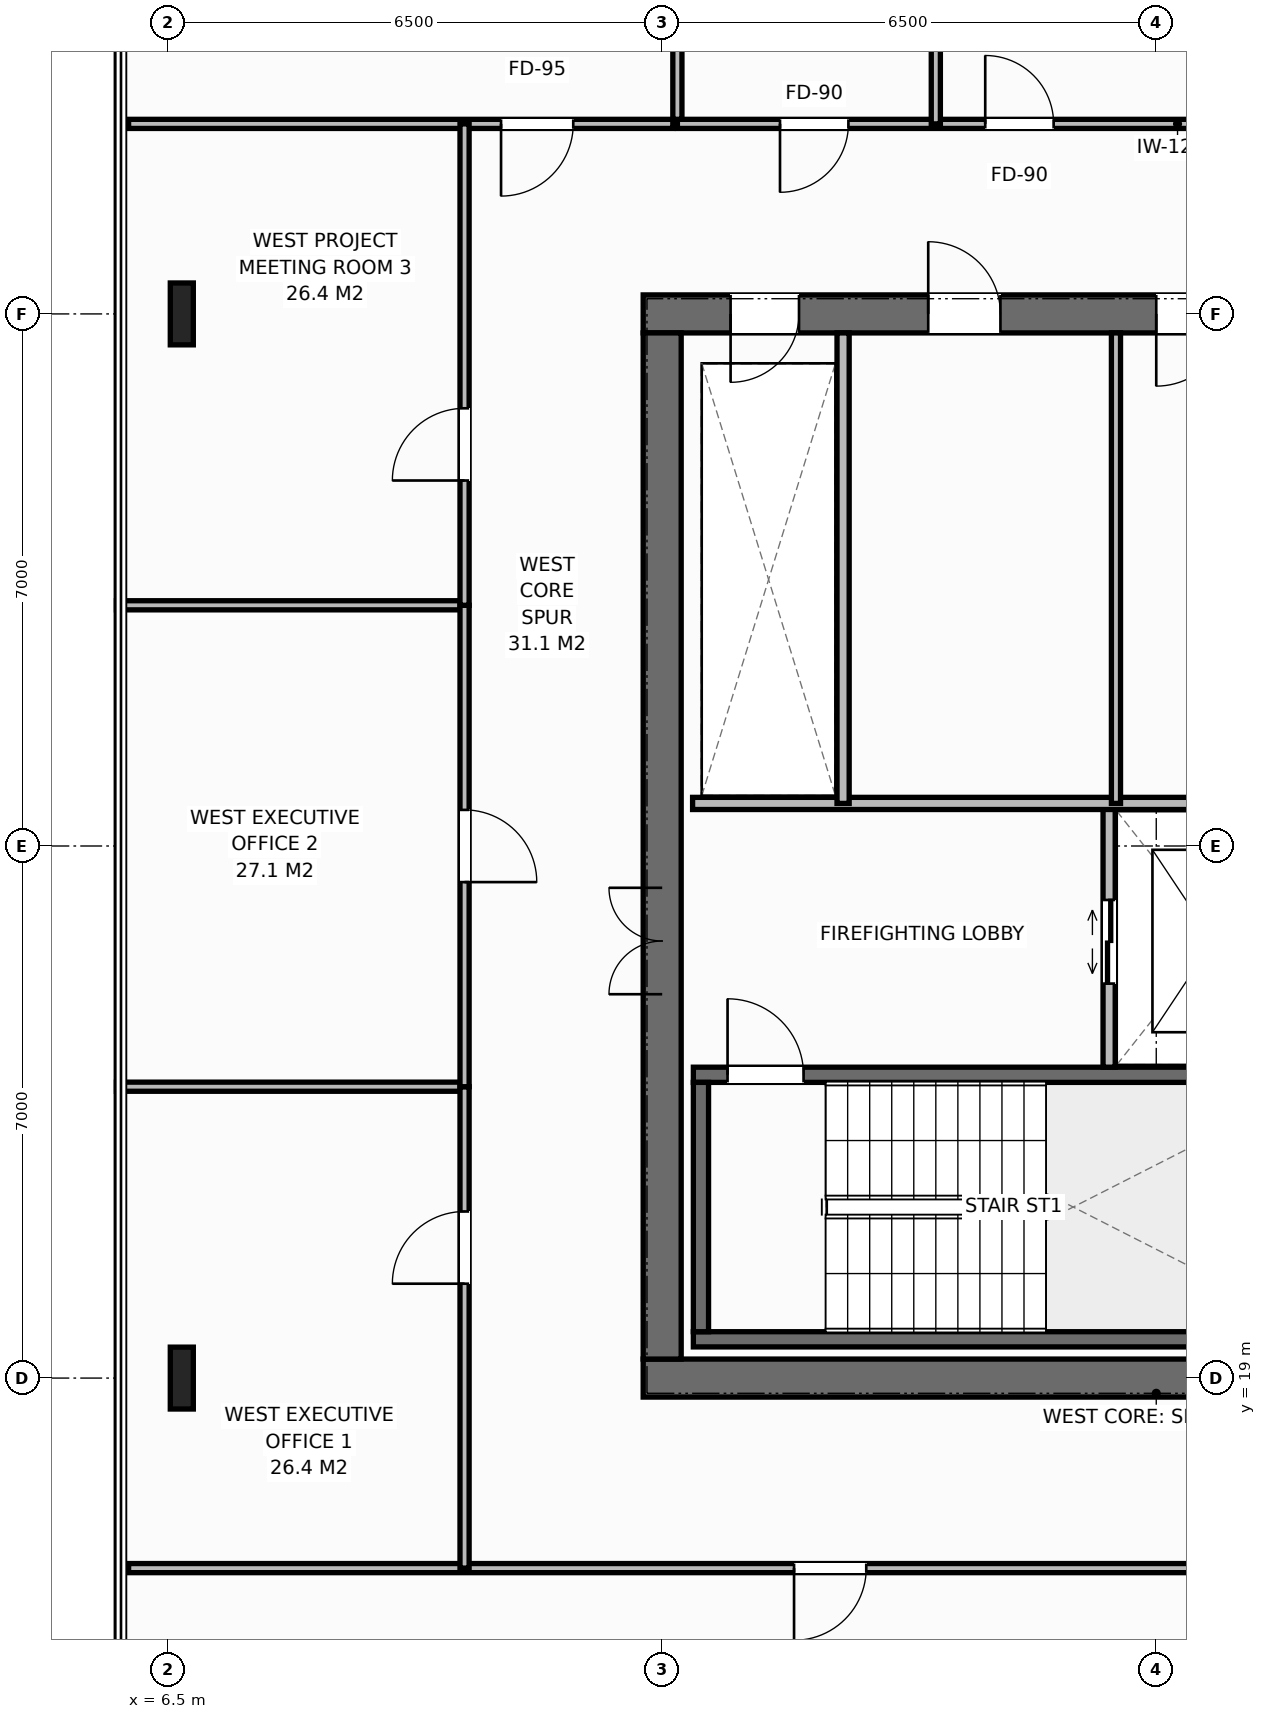
"""IFC4 building model, lengths in metres.
Left out: names, types, materials, properties, quantities, classifications, styles, units other than length and angle.
Written with IfcOpenShell. Run it as: python <this file> out.ifc"""

import sys

from ifc_helpers import new_model, si_unit, direction, frame, frame_2d, origin, origin_2d, place, context, subcontext, project, spatial, rectangle, i_section, extrude, element, fill, save


model = new_model("IFC4")
c1 = context("Model", 3, precision=1e-05, world=origin(), true_north=direction((0.0, 1.0)))
c2 = subcontext(c1, "Body", "Model", "MODEL_VIEW")
j1 = project(units=[si_unit("LENGTHUNIT", "METRE"), si_unit("PLANEANGLEUNIT", "RADIAN")], contexts=[c1])
p1 = place(None, origin())
s1 = spatial("IfcSite", under=j1, at=p1, CompositionType="ELEMENT")
p2 = place(p1, origin())
s2 = spatial("IfcBuilding", under=s1, at=p2, CompositionType="ELEMENT")
p3 = place(p2, frame((0.0, 0.0, 225.2)))
s3 = spatial("IfcBuildingStorey", under=s2, at=p3, CompositionType="ELEMENT", Elevation=225.2)
p4 = place(p3, frame((12.75, 19.0, 0.0), z_axis=(0.0, 0.0, 1.0), x_axis=(1.0, 0.0, 0.0)))
e1 = element("IfcWall", 1, at=p4, inside=s3, PredefinedType="SHEAR", context=c2, shape_type="SweptSolid", body=[
    extrude(rectangle(XDim=13.5, YDim=0.5, at=frame_2d((6.75, 0.0))), origin(), (0.0, 0.0, 1.0), 3.8),
])
p5 = place(p4, frame((9.13, 0.0, 0.0)))
e2 = element("IfcOpeningElement", 2, at=p5, cuts=e1, PredefinedType="OPENING", context=c2, shape_type="SweptSolid", body=[
    extrude(rectangle(XDim=1.4, YDim=2.2, at=frame_2d((0.7, 1.1))), frame((0.0, 0.26, 0.0), z_axis=(0.0, -1.0, 0.0), x_axis=(1.0, 0.0, 0.0)), (0.0, 0.0, 1.0), 0.52),
])
p6 = place(p3, frame((12.75, 33.0, 0.0), z_axis=(0.0, 0.0, 1.0), x_axis=(1.0, 0.0, 0.0)))
e3 = element("IfcWall", 3, at=p6, inside=s3, PredefinedType="SHEAR", context=c2, shape_type="SweptSolid", body=[
    extrude(rectangle(XDim=13.5, YDim=0.5, at=frame_2d((6.75, 0.0))), origin(), (0.0, 0.0, 1.0), 3.8),
])
p7 = place(p6, frame((1.15, 0.0, 0.0)))
e4 = element("IfcOpeningElement", 4, at=p7, cuts=e3, PredefinedType="OPENING", context=c2, shape_type="SweptSolid", body=[
    extrude(rectangle(XDim=0.9, YDim=2.15, at=frame_2d((0.45, 1.075))), frame((0.0, 0.26, 0.0), z_axis=(0.0, -1.0, 0.0), x_axis=(1.0, 0.0, 0.0)), (0.0, 0.0, 1.0), 0.52),
])
p8 = place(p6, frame((3.75, 0.0, 0.0)))
e5 = element("IfcOpeningElement", 5, at=p8, cuts=e3, PredefinedType="OPENING", context=c2, shape_type="SweptSolid", body=[
    extrude(rectangle(XDim=0.95, YDim=2.15, at=frame_2d((0.475, 1.075))), frame((0.0, 0.26, 0.0), z_axis=(0.0, -1.0, 0.0), x_axis=(1.0, 0.0, 0.0)), (0.0, 0.0, 1.0), 0.52),
])
p9 = place(p6, frame((6.75, 0.0, 0.0)))
e6 = element("IfcOpeningElement", 6, at=p9, cuts=e3, PredefinedType="OPENING", context=c2, shape_type="SweptSolid", body=[
    extrude(rectangle(XDim=0.95, YDim=2.15, at=frame_2d((0.475, 1.075))), frame((0.0, 0.26, 0.0), z_axis=(0.0, -1.0, 0.0), x_axis=(1.0, 0.0, 0.0)), (0.0, 0.0, 1.0), 0.52),
])
p10 = place(p6, frame((9.13, 0.0, 0.0)))
e7 = element("IfcOpeningElement", 7, at=p10, cuts=e3, PredefinedType="OPENING", context=c2, shape_type="SweptSolid", body=[
    extrude(rectangle(XDim=1.4, YDim=2.2, at=frame_2d((0.7, 1.1))), frame((0.0, 0.26, 0.0), z_axis=(0.0, -1.0, 0.0), x_axis=(1.0, 0.0, 0.0)), (0.0, 0.0, 1.0), 0.52),
])
p11 = place(p3, frame((13.0, 19.25, 0.0), z_axis=(0.0, 0.0, 1.0), x_axis=(0.0, 1.0, 0.0)))
e8 = element("IfcWall", 8, at=p11, inside=s3, PredefinedType="SHEAR", context=c2, shape_type="SweptSolid", body=[
    extrude(rectangle(XDim=13.5, YDim=0.5, at=frame_2d((6.75, 0.0))), origin(), (0.0, 0.0, 1.0), 3.8),
])
p12 = place(p11, frame((4.8, 0.0, 0.0)))
e9 = element("IfcOpeningElement", 9, at=p12, cuts=e8, PredefinedType="OPENING", context=c2, shape_type="SweptSolid", body=[
    extrude(rectangle(XDim=1.4, YDim=2.2, at=frame_2d((0.7, 1.1))), frame((0.0, 0.26, 0.0), z_axis=(0.0, -1.0, 0.0), x_axis=(1.0, 0.0, 0.0)), (0.0, 0.0, 1.0), 0.52),
])
p13 = place(p3, frame((13.41, 19.51, 0.0), z_axis=(0.0, 0.0, 1.0), x_axis=(1.0, 0.0, 0.0)))
e10 = element("IfcWall", 10, at=p13, inside=s3, PredefinedType="SHEAR", context=c2, shape_type="SweptSolid", body=[
    extrude(rectangle(XDim=8.43, YDim=0.2, at=frame_2d((4.215, 0.0))), origin(), (0.0, 0.0, 1.0), 3.8),
])
p14 = place(p3, frame((13.41, 22.99, 0.0), z_axis=(0.0, 0.0, 1.0), x_axis=(1.0, 0.0, 0.0)))
e11 = element("IfcWall", 11, at=p14, inside=s3, PredefinedType="SHEAR", context=c2, shape_type="SweptSolid", body=[
    extrude(rectangle(XDim=8.43, YDim=0.2, at=frame_2d((4.215, 0.0))), origin(), (0.0, 0.0, 1.0), 3.8),
])
p15 = place(p14, frame((0.45, 0.0, 0.0)))
e12 = element("IfcOpeningElement", 12, at=p15, cuts=e11, PredefinedType="OPENING", context=c2, shape_type="SweptSolid", body=[
    extrude(rectangle(XDim=1.0, YDim=2.15, at=frame_2d((0.5, 1.075))), frame((0.0, 0.11, 0.0), z_axis=(0.0, -1.0, 0.0), x_axis=(1.0, 0.0, 0.0)), (0.0, 0.0, 1.0), 0.22),
])
p16 = place(p3, frame((13.51, 19.61, 0.0), z_axis=(0.0, 0.0, 1.0), x_axis=(0.0, 1.0, 0.0)))
e13 = element("IfcWall", 13, at=p16, inside=s3, PredefinedType="SHEAR", context=c2, shape_type="SweptSolid", body=[
    extrude(rectangle(XDim=3.28, YDim=0.2, at=frame_2d((1.64, 0.0))), origin(), (0.0, 0.0, 1.0), 3.8),
])
for number, where, z_axis, x_axis in (
    (14, (6.68, 19.0, 0.0), (0.0, 0.0, 1.0), (1.0, 0.0, 0.0)),
    (15, (6.68, 33.0, 0.0), (0.0, 0.0, 1.0), (1.0, 0.0, 0.0)),
):
    element("IfcColumn", number, at=place(p3, frame(where, z_axis=z_axis, x_axis=x_axis)), inside=s3, PredefinedType="COLUMN", context=c2, shape_type="SweptSolid", body=[
        extrude(i_section(OverallWidth=0.303, OverallDepth=0.814, WebThickness=0.021, FlangeThickness=0.04, at=origin_2d()), origin(), (0.0, 0.0, 1.0), 3.8),
    ])
p17 = place(p3, frame((18.88, 23.09, 0.0), z_axis=(0.0, 0.0, 1.0), x_axis=(0.0, 1.0, 0.0)))
e16 = element("IfcWall", 16, at=p17, inside=s3, PredefinedType="STANDARD", context=c2, shape_type="SweptSolid", body=[
    extrude(rectangle(XDim=3.47, YDim=0.16, at=frame_2d((1.735, 0.0))), origin(), (0.0, 0.0, 1.0), 3.58),
])
p18 = place(p17, frame((1.1, 0.0, 0.0)))
e17 = element("IfcOpeningElement", 17, at=p18, cuts=e16, PredefinedType="OPENING", context=c2, shape_type="SweptSolid", body=[
    extrude(rectangle(XDim=1.1, YDim=2.2, at=frame_2d((0.55, 1.1))), frame((0.0, 0.09, 0.0), z_axis=(0.0, -1.0, 0.0), x_axis=(1.0, 0.0, 0.0)), (0.0, 0.0, 1.0), 0.18),
])
p19 = place(p3, frame((13.4, 26.56, 0.0), z_axis=(0.0, 0.0, 1.0), x_axis=(1.0, 0.0, 0.0)))
e18 = element("IfcWall", 18, at=p19, inside=s3, PredefinedType="STANDARD", context=c2, shape_type="SweptSolid", body=[
    extrude(rectangle(XDim=8.34, YDim=0.16, at=frame_2d((4.17, 0.0))), origin(), (0.0, 0.0, 1.0), 3.58),
])
p20 = place(p3, frame((15.38, 26.56, 0.0), z_axis=(0.0, 0.0, 1.0), x_axis=(0.0, 1.0, 0.0)))
e19 = element("IfcWall", 19, at=p20, inside=s3, PredefinedType="STANDARD", context=c2, shape_type="SweptSolid", body=[
    extrude(rectangle(XDim=6.19, YDim=0.16, at=frame_2d((3.095, 0.0))), origin(), (0.0, 0.0, 1.0), 3.58),
])
p21 = place(p3, frame((18.97, 26.56, 0.0), z_axis=(0.0, 0.0, 1.0), x_axis=(0.0, 1.0, 0.0)))
e20 = element("IfcWall", 20, at=p21, inside=s3, PredefinedType="PARTITIONING", context=c2, shape_type="SweptSolid", body=[
    extrude(rectangle(XDim=6.19, YDim=0.12, at=frame_2d((3.095, 0.0))), origin(), (0.0, 0.0, 1.0), 3.58),
])
p22 = place(p3, frame((13.2, 35.5, 0.0), z_axis=(0.0, 0.0, 1.0), x_axis=(1.0, 0.0, 0.0)))
e21 = element("IfcWall", 21, at=p22, inside=s3, PredefinedType="PARTITIONING", context=c2, shape_type="SweptSolid", body=[
    extrude(rectangle(XDim=13.16, YDim=0.12, at=frame_2d((6.58, 0.0))), origin(), (0.0, 0.0, 1.0), 3.58),
])
p23 = place(p22, frame((1.35, 0.0, 0.0)))
e22 = element("IfcOpeningElement", 22, at=p23, cuts=e21, PredefinedType="OPENING", context=c2, shape_type="SweptSolid", body=[
    extrude(rectangle(XDim=0.9, YDim=2.15, at=frame_2d((0.45, 1.075))), frame((0.0, 0.07, 0.0), z_axis=(0.0, -1.0, 0.0), x_axis=(1.0, 0.0, 0.0)), (0.0, 0.0, 1.0), 0.14),
])
p24 = place(p22, frame((4.05, 0.0, 0.0)))
e23 = element("IfcOpeningElement", 23, at=p24, cuts=e21, PredefinedType="OPENING", context=c2, shape_type="SweptSolid", body=[
    extrude(rectangle(XDim=0.9, YDim=2.15, at=frame_2d((0.45, 1.075))), frame((0.0, 0.07, 0.0), z_axis=(0.0, -1.0, 0.0), x_axis=(1.0, 0.0, 0.0)), (0.0, 0.0, 1.0), 0.14),
])
p25 = place(p22, frame((8.25, 0.0, 0.0)))
e24 = element("IfcOpeningElement", 24, at=p25, cuts=e21, PredefinedType="OPENING", context=c2, shape_type="SweptSolid", body=[
    extrude(rectangle(XDim=0.9, YDim=2.15, at=frame_2d((0.45, 1.075))), frame((0.0, 0.07, 0.0), z_axis=(0.0, -1.0, 0.0), x_axis=(1.0, 0.0, 0.0)), (0.0, 0.0, 1.0), 0.14),
])
p26 = place(p22, frame((11.0, 0.0, 0.0)))
e25 = element("IfcOpeningElement", 25, at=p26, cuts=e21, PredefinedType="OPENING", context=c2, shape_type="SweptSolid", body=[
    extrude(rectangle(XDim=0.95, YDim=2.15, at=frame_2d((0.475, 1.075))), frame((0.0, 0.07, 0.0), z_axis=(0.0, -1.0, 0.0), x_axis=(1.0, 0.0, 0.0)), (0.0, 0.0, 1.0), 0.14),
])
p27 = place(p3, frame((16.6, 35.5, 0.0), z_axis=(0.0, 0.0, 1.0), x_axis=(0.0, 1.0, 0.0)))
e26 = element("IfcWall", 26, at=p27, inside=s3, PredefinedType="PARTITIONING", context=c2, shape_type="SweptSolid", body=[
    extrude(rectangle(XDim=2.68, YDim=0.12, at=frame_2d((1.34, 0.0))), origin(), (0.0, 0.0, 1.0), 3.58),
])
p28 = place(p3, frame((13.2, 35.56, 0.0), z_axis=(0.0, 0.0, 1.0), x_axis=(0.0, 1.0, 0.0)))
e27 = element("IfcWall", 27, at=p28, inside=s3, PredefinedType="PARTITIONING", context=c2, shape_type="SweptSolid", body=[
    extrude(rectangle(XDim=11.42, YDim=0.12, at=frame_2d((5.71, 0.0))), origin(), (0.0, 0.0, 1.0), 2.88),
])
p29 = place(p3, frame((5.98, 35.5, 0.0), z_axis=(0.0, 0.0, 1.0), x_axis=(1.0, 0.0, 0.0)))
e28 = element("IfcWall", 28, at=p29, inside=s3, PredefinedType="PARTITIONING", context=c2, shape_type="SweptSolid", body=[
    extrude(rectangle(XDim=7.16, YDim=0.12, at=frame_2d((3.58, 0.0))), origin(), (0.0, 0.0, 1.0), 3.58),
])
p30 = place(p29, frame((4.9, 0.0, 0.0)))
e29 = element("IfcOpeningElement", 29, at=p30, cuts=e28, PredefinedType="OPENING", context=c2, shape_type="SweptSolid", body=[
    extrude(rectangle(XDim=0.95, YDim=2.15, at=frame_2d((0.475, 1.075))), frame((0.0, 0.07, 0.0), z_axis=(0.0, -1.0, 0.0), x_axis=(1.0, 0.0, 0.0)), (0.0, 0.0, 1.0), 0.14),
])
p31 = place(p3, frame((5.98, 16.5, 0.0), z_axis=(0.0, 0.0, 1.0), x_axis=(1.0, 0.0, 0.0)))
e30 = element("IfcWall", 30, at=p31, inside=s3, PredefinedType="PARTITIONING", context=c2, shape_type="SweptSolid", body=[
    extrude(rectangle(XDim=14.04, YDim=0.12, at=frame_2d((7.02, 0.0))), origin(), (0.0, 0.0, 1.0), 3.58),
])
p32 = place(p31, frame((8.755, 0.0, 0.0)))
e31 = element("IfcOpeningElement", 31, at=p32, cuts=e30, PredefinedType="OPENING", context=c2, shape_type="SweptSolid", body=[
    extrude(rectangle(XDim=0.95, YDim=2.15, at=frame_2d((0.475, 1.075))), frame((0.0, 0.07, 0.0), z_axis=(0.0, -1.0, 0.0), x_axis=(1.0, 0.0, 0.0)), (0.0, 0.0, 1.0), 0.14),
])
p33 = place(p3, frame((5.82, 22.833, 0.0), z_axis=(0.0, 0.0, 1.0), x_axis=(1.0, 0.0, 0.0)))
e32 = element("IfcWall", 32, at=p33, inside=s3, PredefinedType="PARTITIONING", context=c2, shape_type="SweptSolid", body=[
    extrude(rectangle(XDim=4.58, YDim=0.12, at=frame_2d((2.29, 0.0))), origin(), (0.0, 0.0, 1.0), 3.58),
])
p34 = place(p3, frame((10.4, 16.5, 0.0), z_axis=(0.0, 0.0, 1.0), x_axis=(0.0, 1.0, 0.0)))
e33 = element("IfcWall", 33, at=p34, inside=s3, PredefinedType="PARTITIONING", context=c2, shape_type="SweptSolid", body=[
    extrude(rectangle(XDim=6.333, YDim=0.12, at=frame_2d((3.167, 0.0))), origin(), (0.0, 0.0, 1.0), 3.58),
])
p35 = place(p34, frame((3.742, 0.0, 0.0)))
e34 = element("IfcOpeningElement", 34, at=p35, cuts=e33, PredefinedType="OPENING", context=c2, shape_type="SweptSolid", body=[
    extrude(rectangle(XDim=0.95, YDim=2.15, at=frame_2d((0.475, 1.075))), frame((0.0, 0.07, 0.0), z_axis=(0.0, -1.0, 0.0), x_axis=(1.0, 0.0, 0.0)), (0.0, 0.0, 1.0), 0.14),
])
p36 = place(p3, frame((5.82, 29.167, 0.0), z_axis=(0.0, 0.0, 1.0), x_axis=(1.0, 0.0, 0.0)))
e35 = element("IfcWall", 35, at=p36, inside=s3, PredefinedType="PARTITIONING", context=c2, shape_type="SweptSolid", body=[
    extrude(rectangle(XDim=4.58, YDim=0.12, at=frame_2d((2.29, 0.0))), origin(), (0.0, 0.0, 1.0), 3.58),
])
p37 = place(p3, frame((10.4, 22.833, 0.0), z_axis=(0.0, 0.0, 1.0), x_axis=(0.0, 1.0, 0.0)))
e36 = element("IfcWall", 36, at=p37, inside=s3, PredefinedType="PARTITIONING", context=c2, shape_type="SweptSolid", body=[
    extrude(rectangle(XDim=6.333, YDim=0.12, at=frame_2d((3.167, 0.0))), origin(), (0.0, 0.0, 1.0), 3.58),
])
p38 = place(p37, frame((2.692, 0.0, 0.0)))
e37 = element("IfcOpeningElement", 37, at=p38, cuts=e36, PredefinedType="OPENING", context=c2, shape_type="SweptSolid", body=[
    extrude(rectangle(XDim=0.95, YDim=2.15, at=frame_2d((0.475, 1.075))), frame((0.0, 0.07, 0.0), z_axis=(0.0, -1.0, 0.0), x_axis=(1.0, 0.0, 0.0)), (0.0, 0.0, 1.0), 0.14),
])
p39 = place(p3, frame((10.4, 29.167, 0.0), z_axis=(0.0, 0.0, 1.0), x_axis=(0.0, 1.0, 0.0)))
e38 = element("IfcWall", 38, at=p39, inside=s3, PredefinedType="PARTITIONING", context=c2, shape_type="SweptSolid", body=[
    extrude(rectangle(XDim=6.333, YDim=0.12, at=frame_2d((3.167, 0.0))), origin(), (0.0, 0.0, 1.0), 3.58),
])
p40 = place(p39, frame((1.642, 0.0, 0.0)))
e39 = element("IfcOpeningElement", 39, at=p40, cuts=e38, PredefinedType="OPENING", context=c2, shape_type="SweptSolid", body=[
    extrude(rectangle(XDim=0.95, YDim=2.15, at=frame_2d((0.475, 1.075))), frame((0.0, 0.07, 0.0), z_axis=(0.0, -1.0, 0.0), x_axis=(1.0, 0.0, 0.0)), (0.0, 0.0, 1.0), 0.14),
])
p41 = place(p15, origin())
e40 = element("IfcDoor", 40, at=p41, inside=s3, OperationType="SINGLE_SWING_LEFT", PredefinedType="DOOR", context=c2, shape_type="SweptSolid", body=[
    extrude(rectangle(XDim=1.0, YDim=2.15, at=frame_2d((0.5, 1.075))), frame((0.0, 0.025, 0.0), z_axis=(0.0, -1.0, 0.0), x_axis=(1.0, 0.0, 0.0)), (0.0, 0.0, 1.0), 0.05),
])
fill(e12, e40)
p42 = place(p12, origin())
e41 = element("IfcDoor", 41, at=p42, inside=s3, OperationType="DOUBLE_DOOR_SINGLE_SWING", PredefinedType="DOOR", context=c2, shape_type="SweptSolid", body=[
    extrude(rectangle(XDim=1.4, YDim=2.2, at=frame_2d((0.7, 1.1))), frame((0.0, 0.025, 0.0), z_axis=(0.0, -1.0, 0.0), x_axis=(1.0, 0.0, 0.0)), (0.0, 0.0, 1.0), 0.05),
])
fill(e9, e41)
p43 = place(p18, origin())
e42 = element("IfcDoor", 42, at=p43, inside=s3, OperationType="DOUBLE_DOOR_SLIDING", PredefinedType="DOOR", context=c2, shape_type="SweptSolid", body=[
    extrude(rectangle(XDim=1.1, YDim=2.2, at=frame_2d((0.55, 1.1))), frame((0.0, 0.025, 0.0), z_axis=(0.0, -1.0, 0.0), x_axis=(1.0, 0.0, 0.0)), (0.0, 0.0, 1.0), 0.05),
])
fill(e17, e42)
p44 = place(p7, origin())
e43 = element("IfcDoor", 43, at=p44, inside=s3, OperationType="SINGLE_SWING_RIGHT", PredefinedType="DOOR", context=c2, shape_type="SweptSolid", body=[
    extrude(rectangle(XDim=0.9, YDim=2.15, at=frame_2d((0.45, 1.075))), frame((0.0, -0.025, 0.0), z_axis=(0.0, -1.0, 0.0), x_axis=(1.0, 0.0, 0.0)), (0.0, 0.0, 1.0), 0.05),
])
fill(e4, e43)
p45 = place(p8, origin())
e44 = element("IfcDoor", 44, at=p45, inside=s3, OperationType="SINGLE_SWING_LEFT", PredefinedType="DOOR", context=c2, shape_type="SweptSolid", body=[
    extrude(rectangle(XDim=0.95, YDim=2.15, at=frame_2d((0.475, 1.075))), frame((0.0, -0.025, 0.0), z_axis=(0.0, -1.0, 0.0), x_axis=(1.0, 0.0, 0.0)), (0.0, 0.0, 1.0), 0.05),
])
fill(e5, e44)
p46 = place(p9, origin())
e45 = element("IfcDoor", 45, at=p46, inside=s3, OperationType="SINGLE_SWING_RIGHT", PredefinedType="DOOR", context=c2, shape_type="SweptSolid", body=[
    extrude(rectangle(XDim=0.95, YDim=2.15, at=frame_2d((0.475, 1.075))), frame((0.0, -0.025, 0.0), z_axis=(0.0, -1.0, 0.0), x_axis=(1.0, 0.0, 0.0)), (0.0, 0.0, 1.0), 0.05),
])
fill(e6, e45)
p47 = place(p23, origin())
e46 = element("IfcDoor", 46, at=p47, inside=s3, OperationType="SINGLE_SWING_RIGHT", PredefinedType="DOOR", context=c2, shape_type="SweptSolid", body=[
    extrude(rectangle(XDim=0.9, YDim=2.15, at=frame_2d((0.45, 1.075))), frame((0.0, 0.025, 0.0), z_axis=(0.0, -1.0, 0.0), x_axis=(1.0, 0.0, 0.0)), (0.0, 0.0, 1.0), 0.05),
])
fill(e22, e46)
p48 = place(p24, origin())
e47 = element("IfcDoor", 47, at=p48, inside=s3, OperationType="SINGLE_SWING_LEFT", PredefinedType="DOOR", context=c2, shape_type="SweptSolid", body=[
    extrude(rectangle(XDim=0.9, YDim=2.15, at=frame_2d((0.45, 1.075))), frame((0.0, 0.025, 0.0), z_axis=(0.0, -1.0, 0.0), x_axis=(1.0, 0.0, 0.0)), (0.0, 0.0, 1.0), 0.05),
])
fill(e23, e47)
p49 = place(p30, origin())
e48 = element("IfcDoor", 48, at=p49, inside=s3, OperationType="SINGLE_SWING_RIGHT", PredefinedType="DOOR", context=c2, shape_type="SweptSolid", body=[
    extrude(rectangle(XDim=0.95, YDim=2.15, at=frame_2d((0.475, 1.075))), frame((0.0, 0.025, 0.0), z_axis=(0.0, -1.0, 0.0), x_axis=(1.0, 0.0, 0.0)), (0.0, 0.0, 1.0), 0.05),
])
fill(e29, e48)
p50 = place(p32, origin())
e49 = element("IfcDoor", 49, at=p50, inside=s3, OperationType="SINGLE_SWING_RIGHT", PredefinedType="DOOR", context=c2, shape_type="SweptSolid", body=[
    extrude(rectangle(XDim=0.95, YDim=2.15, at=frame_2d((0.475, 1.075))), frame((0.0, 0.025, 0.0), z_axis=(0.0, -1.0, 0.0), x_axis=(1.0, 0.0, 0.0)), (0.0, 0.0, 1.0), 0.05),
])
fill(e31, e49)
p51 = place(p35, origin())
e50 = element("IfcDoor", 50, at=p51, inside=s3, OperationType="SINGLE_SWING_LEFT", PredefinedType="DOOR", context=c2, shape_type="SweptSolid", body=[
    extrude(rectangle(XDim=0.95, YDim=2.15, at=frame_2d((0.475, 1.075))), frame((0.0, 0.025, 0.0), z_axis=(0.0, -1.0, 0.0), x_axis=(1.0, 0.0, 0.0)), (0.0, 0.0, 1.0), 0.05),
])
fill(e34, e50)
p52 = place(p38, origin())
e51 = element("IfcDoor", 51, at=p52, inside=s3, OperationType="SINGLE_SWING_RIGHT", PredefinedType="DOOR", context=c2, shape_type="SweptSolid", body=[
    extrude(rectangle(XDim=0.95, YDim=2.15, at=frame_2d((0.475, 1.075))), frame((0.0, 0.025, 0.0), z_axis=(0.0, -1.0, 0.0), x_axis=(1.0, 0.0, 0.0)), (0.0, 0.0, 1.0), 0.05),
])
fill(e37, e51)
p53 = place(p40, origin())
e52 = element("IfcDoor", 52, at=p53, inside=s3, OperationType="SINGLE_SWING_LEFT", PredefinedType="DOOR", context=c2, shape_type="SweptSolid", body=[
    extrude(rectangle(XDim=0.95, YDim=2.15, at=frame_2d((0.475, 1.075))), frame((0.0, 0.025, 0.0), z_axis=(0.0, -1.0, 0.0), x_axis=(1.0, 0.0, 0.0)), (0.0, 0.0, 1.0), 0.05),
])
fill(e39, e52)
save(model, sys.argv[1])
